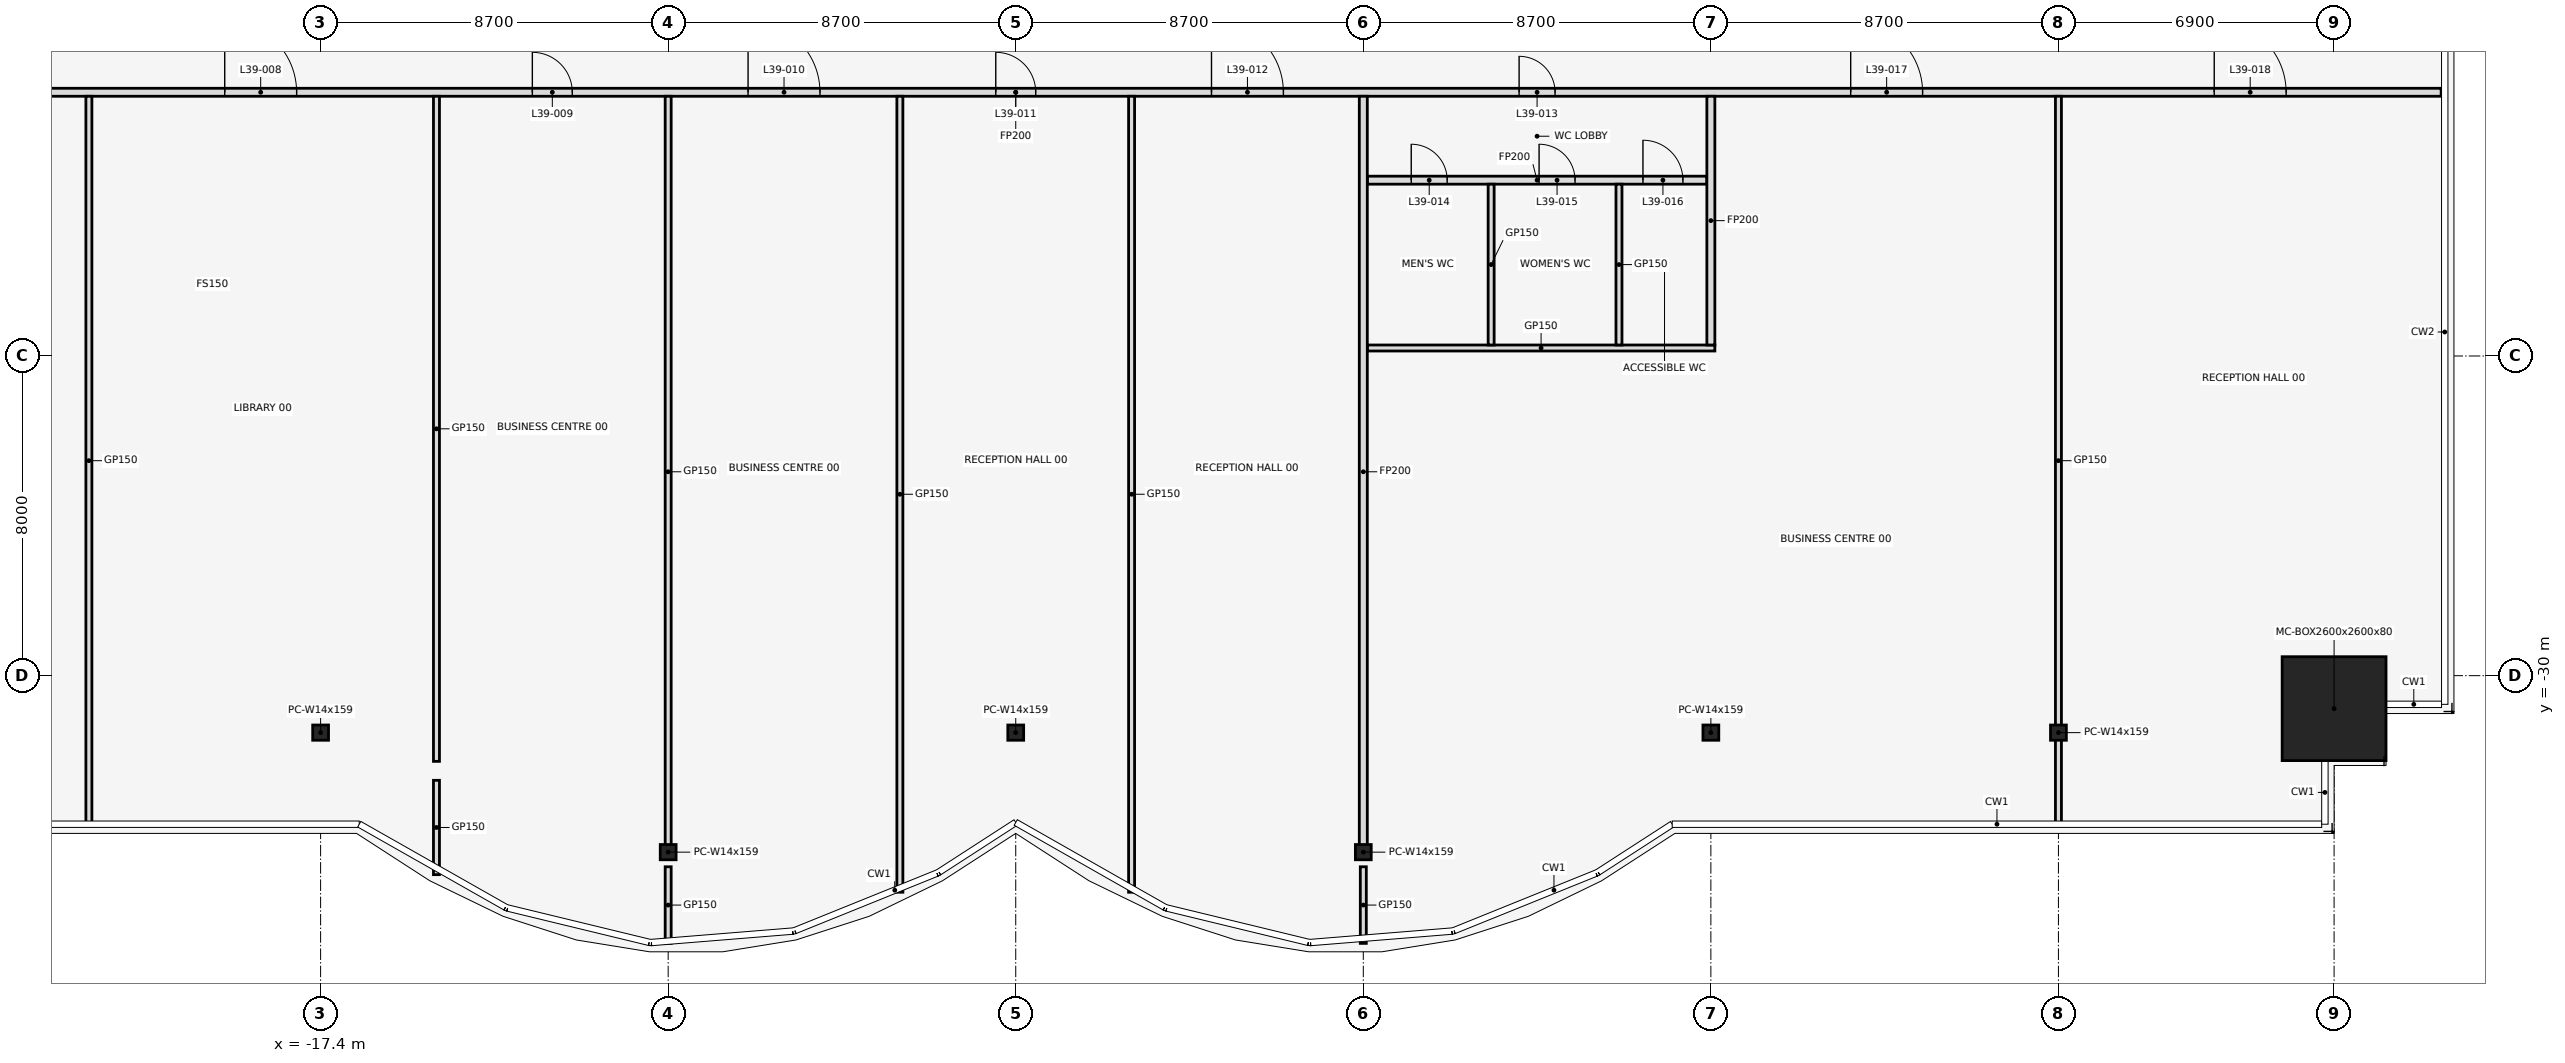
"""IFC4 building model, lengths in metres.
Left out: names, types, materials, properties, quantities, classifications, styles, units other than length and angle.
Written with IfcOpenShell. Run it as: python <this file> out.ifc"""

import sys

from ifc_helpers import new_model, si_unit, direction, frame, frame_2d, origin, origin_2d, place, context, subcontext, project, spatial, rectangle, hollow_rectangle, i_section, extrude, element, fill, save


model = new_model("IFC4")
c1 = context("Model", 3, precision=1e-05, world=origin(), true_north=direction((0.0, 1.0)))
c2 = subcontext(c1, "Body", "Model", "MODEL_VIEW")
j1 = project(units=[si_unit("LENGTHUNIT", "METRE"), si_unit("PLANEANGLEUNIT", "RADIAN")], contexts=[c1])
p1 = place(None, origin())
s1 = spatial("IfcSite", under=j1, at=p1, CompositionType="ELEMENT")
p2 = place(p1, origin())
s2 = spatial("IfcBuilding", under=s1, at=p2, CompositionType="ELEMENT")
p3 = place(p2, frame((0.0, 0.0, 177.3)))
s3 = spatial("IfcBuildingStorey", under=s2, at=p3, CompositionType="ELEMENT", Elevation=177.3)
for number, where, z_axis, x_axis in (
    (1, (-17.4, -31.426, 0.0), (0.0, 0.0, 1.0), (1.0, 0.0, 0.0)),
    (2, (-8.7, -34.417, 0.0), (0.0, 0.0, 1.0), (1.0, 0.0, 0.0)),
    (3, (0.0, -31.426, 0.0), (0.0, 0.0, 1.0), (1.0, 0.0, 0.0)),
    (4, (8.7, -34.417, 0.0), (0.0, 0.0, 1.0), (1.0, 0.0, 0.0)),
    (5, (17.4, -31.426, 0.0), (0.0, 0.0, 1.0), (1.0, 0.0, 0.0)),
    (6, (26.1, -31.426, 0.0), (0.0, 0.0, 1.0), (1.0, 0.0, 0.0)),
):
    element("IfcColumn", number, at=place(p3, frame(where, z_axis=z_axis, x_axis=x_axis)), inside=s3, PredefinedType="COLUMN", context=c2, shape_type="SweptSolid", body=[
        extrude(i_section(OverallWidth=0.396, OverallDepth=0.381, WebThickness=0.019, FlangeThickness=0.03, at=origin_2d()), origin(), (0.0, 0.0, 1.0), 4.1),
    ])
p4 = place(p3, frame((33.0, -30.826, 0.0), z_axis=(0.0, 0.0, 1.0), x_axis=(1.0, 0.0, 0.0)))
e7 = element("IfcColumn", 7, at=p4, inside=s3, PredefinedType="COLUMN", context=c2, shape_type="SweptSolid", body=[
    extrude(hollow_rectangle(XDim=2.6, YDim=2.6, WallThickness=0.08, at=origin_2d()), origin(), (0.0, 0.0, 1.0), 4.1),
])
p5 = place(p3, frame((8.8, -21.8, 0.0), z_axis=(0.0, 0.0, 1.0), x_axis=(1.0, 0.0, 0.0)))
e8 = element("IfcWall", 8, at=p5, inside=s3, PredefinedType="PARTITIONING", context=c2, shape_type="SweptSolid", body=[
    extrude(rectangle(XDim=8.7, YDim=0.15, at=frame_2d((4.35, 0.0))), origin(), (0.0, 0.0, 1.0), 2.84),
])
p6 = place(p3, frame((8.8, -17.6, 0.0), z_axis=(0.0, 0.0, 1.0), x_axis=(1.0, 0.0, 0.0)))
e9 = element("IfcWall", 9, at=p6, inside=s3, PredefinedType="PARTITIONING", context=c2, shape_type="SweptSolid", body=[
    extrude(rectangle(XDim=8.5, YDim=0.2, at=frame_2d((4.25, 0.0))), origin(), (0.0, 0.0, 1.0), 2.84),
])
p7 = place(p6, frame((1.1, 0.0, 0.0)))
e10 = element("IfcOpeningElement", 10, at=p7, cuts=e9, PredefinedType="OPENING", context=c2, shape_type="SweptSolid", body=[
    extrude(rectangle(XDim=0.9, YDim=2.1, at=frame_2d((0.45, 1.05))), frame((0.0, 0.112, 0.0), z_axis=(0.0, -1.0, 0.0), x_axis=(1.0, 0.0, 0.0)), (0.0, 0.0, 1.0), 0.224),
])
p8 = place(p6, frame((4.3, 0.0, 0.0)))
e11 = element("IfcOpeningElement", 11, at=p8, cuts=e9, PredefinedType="OPENING", context=c2, shape_type="SweptSolid", body=[
    extrude(rectangle(XDim=0.9, YDim=2.1, at=frame_2d((0.45, 1.05))), frame((0.0, 0.112, 0.0), z_axis=(0.0, -1.0, 0.0), x_axis=(1.0, 0.0, 0.0)), (0.0, 0.0, 1.0), 0.224),
])
p9 = place(p6, frame((6.9, 0.0, 0.0)))
e12 = element("IfcOpeningElement", 12, at=p9, cuts=e9, PredefinedType="OPENING", context=c2, shape_type="SweptSolid", body=[
    extrude(rectangle(XDim=1.0, YDim=2.1, at=frame_2d((0.5, 1.05))), frame((0.0, 0.112, 0.0), z_axis=(0.0, -1.0, 0.0), x_axis=(1.0, 0.0, 0.0)), (0.0, 0.0, 1.0), 0.224),
])
p10 = place(p3, frame((-35.68, -15.4, 0.0), z_axis=(0.0, 0.0, 1.0), x_axis=(1.0, 0.0, 0.0)))
e13 = element("IfcWall", 13, at=p10, inside=s3, PredefinedType="PARTITIONING", context=c2, shape_type="SweptSolid", body=[
    extrude(rectangle(XDim=71.36, YDim=0.2, at=frame_2d((35.68, 0.0))), origin(), (0.0, 0.0, 1.0), 2.84),
])
p11 = place(p10, frame((5.3, 0.0, 0.0)))
e14 = element("IfcOpeningElement", 14, at=p11, cuts=e13, PredefinedType="OPENING", context=c2, shape_type="SweptSolid", body=[
    extrude(rectangle(XDim=1.8, YDim=2.1, at=frame_2d((0.9, 1.05))), frame((0.0, 0.112, 0.0), z_axis=(0.0, -1.0, 0.0), x_axis=(1.0, 0.0, 0.0)), (0.0, 0.0, 1.0), 0.224),
])
p12 = place(p10, frame((15.88, 0.0, 0.0)))
e15 = element("IfcOpeningElement", 15, at=p12, cuts=e13, PredefinedType="OPENING", context=c2, shape_type="SweptSolid", body=[
    extrude(rectangle(XDim=1.8, YDim=2.1, at=frame_2d((0.9, 1.05))), frame((0.0, 0.112, 0.0), z_axis=(0.0, -1.0, 0.0), x_axis=(1.0, 0.0, 0.0)), (0.0, 0.0, 1.0), 0.224),
])
p13 = place(p10, frame((23.58, 0.0, 0.0)))
e16 = element("IfcOpeningElement", 16, at=p13, cuts=e13, PredefinedType="OPENING", context=c2, shape_type="SweptSolid", body=[
    extrude(rectangle(XDim=1.0, YDim=2.1, at=frame_2d((0.5, 1.05))), frame((0.0, 0.112, 0.0), z_axis=(0.0, -1.0, 0.0), x_axis=(1.0, 0.0, 0.0)), (0.0, 0.0, 1.0), 0.224),
])
p14 = place(p10, frame((28.98, 0.0, 0.0)))
e17 = element("IfcOpeningElement", 17, at=p14, cuts=e13, PredefinedType="OPENING", context=c2, shape_type="SweptSolid", body=[
    extrude(rectangle(XDim=1.8, YDim=2.1, at=frame_2d((0.9, 1.05))), frame((0.0, 0.112, 0.0), z_axis=(0.0, -1.0, 0.0), x_axis=(1.0, 0.0, 0.0)), (0.0, 0.0, 1.0), 0.224),
])
p15 = place(p10, frame((35.18, 0.0, 0.0)))
e18 = element("IfcOpeningElement", 18, at=p15, cuts=e13, PredefinedType="OPENING", context=c2, shape_type="SweptSolid", body=[
    extrude(rectangle(XDim=1.0, YDim=2.1, at=frame_2d((0.5, 1.05))), frame((0.0, 0.112, 0.0), z_axis=(0.0, -1.0, 0.0), x_axis=(1.0, 0.0, 0.0)), (0.0, 0.0, 1.0), 0.224),
])
p16 = place(p10, frame((40.58, 0.0, 0.0)))
e19 = element("IfcOpeningElement", 19, at=p16, cuts=e13, PredefinedType="OPENING", context=c2, shape_type="SweptSolid", body=[
    extrude(rectangle(XDim=1.8, YDim=2.1, at=frame_2d((0.9, 1.05))), frame((0.0, 0.112, 0.0), z_axis=(0.0, -1.0, 0.0), x_axis=(1.0, 0.0, 0.0)), (0.0, 0.0, 1.0), 0.224),
])
p17 = place(p10, frame((48.28, 0.0, 0.0)))
e20 = element("IfcOpeningElement", 20, at=p17, cuts=e13, PredefinedType="OPENING", context=c2, shape_type="SweptSolid", body=[
    extrude(rectangle(XDim=0.9, YDim=2.1, at=frame_2d((0.45, 1.05))), frame((0.0, 0.112, 0.0), z_axis=(0.0, -1.0, 0.0), x_axis=(1.0, 0.0, 0.0)), (0.0, 0.0, 1.0), 0.224),
])
p18 = place(p10, frame((56.58, 0.0, 0.0)))
e21 = element("IfcOpeningElement", 21, at=p18, cuts=e13, PredefinedType="OPENING", context=c2, shape_type="SweptSolid", body=[
    extrude(rectangle(XDim=1.8, YDim=2.1, at=frame_2d((0.9, 1.05))), frame((0.0, 0.112, 0.0), z_axis=(0.0, -1.0, 0.0), x_axis=(1.0, 0.0, 0.0)), (0.0, 0.0, 1.0), 0.224),
])
p19 = place(p10, frame((65.68, 0.0, 0.0)))
e22 = element("IfcOpeningElement", 22, at=p19, cuts=e13, PredefinedType="OPENING", context=c2, shape_type="SweptSolid", body=[
    extrude(rectangle(XDim=1.8, YDim=2.1, at=frame_2d((0.9, 1.05))), frame((0.0, 0.112, 0.0), z_axis=(0.0, -1.0, 0.0), x_axis=(1.0, 0.0, 0.0)), (0.0, 0.0, 1.0), 0.224),
])
p20 = place(p3, frame((-23.2, -33.74, 0.0), z_axis=(0.0, 0.0, 1.0), x_axis=(0.0, 1.0, 0.0)))
e23 = element("IfcWall", 23, at=p20, inside=s3, PredefinedType="PARTITIONING", context=c2, shape_type="SweptSolid", body=[
    extrude(rectangle(XDim=18.24, YDim=0.15, at=frame_2d((9.12, 0.0))), origin(), (0.0, 0.0, 1.0), 2.84),
])
p21 = place(p3, frame((-14.5, -34.98, 0.0), z_axis=(0.0, 0.0, 1.0), x_axis=(0.0, 1.0, 0.0)))
e24 = element("IfcWall", 24, at=p21, inside=s3, PredefinedType="PARTITIONING", context=c2, shape_type="SweptSolid", body=[
    extrude(rectangle(XDim=2.36, YDim=0.15, at=frame_2d((1.18, 0.0))), origin(), (0.0, 0.0, 1.0), 2.84),
])
p22 = place(p3, frame((-14.5, -32.145, 0.0), z_axis=(0.0, 0.0, 1.0), x_axis=(0.0, 1.0, 0.0)))
e25 = element("IfcWall", 25, at=p22, inside=s3, PredefinedType="PARTITIONING", context=c2, shape_type="SweptSolid", body=[
    extrude(rectangle(XDim=16.645, YDim=0.15, at=frame_2d((8.323, 0.0))), origin(), (0.0, 0.0, 1.0), 2.84),
])
p23 = place(p3, frame((-8.7, -36.7, 0.0), z_axis=(0.0, 0.0, 1.0), x_axis=(0.0, 1.0, 0.0)))
e26 = element("IfcWall", 26, at=p23, inside=s3, PredefinedType="PARTITIONING", context=c2, shape_type="SweptSolid", body=[
    extrude(rectangle(XDim=1.917, YDim=0.15, at=frame_2d((0.958, 0.0))), origin(), (0.0, 0.0, 1.0), 2.84),
])
p24 = place(p3, frame((-8.7, -34.295, 0.0), z_axis=(0.0, 0.0, 1.0), x_axis=(0.0, 1.0, 0.0)))
e27 = element("IfcWall", 27, at=p24, inside=s3, PredefinedType="PARTITIONING", context=c2, shape_type="SweptSolid", body=[
    extrude(rectangle(XDim=18.795, YDim=0.15, at=frame_2d((9.397, 0.0))), origin(), (0.0, 0.0, 1.0), 2.84),
])
for number, where, z_axis, x_axis in (
    (28, (-2.9, -35.42, 0.0), (0.0, 0.0, 1.0), (0.0, 1.0, 0.0)),
    (29, (2.9, -35.42, 0.0), (0.0, 0.0, 1.0), (0.0, 1.0, 0.0)),
):
    element("IfcWall", number, at=place(p3, frame(where, z_axis=z_axis, x_axis=x_axis)), inside=s3, PredefinedType="PARTITIONING", context=c2, shape_type="SweptSolid", body=[
        extrude(rectangle(XDim=19.92, YDim=0.15, at=frame_2d((9.96, 0.0))), origin(), (0.0, 0.0, 1.0), 2.84),
    ])
p25 = place(p3, frame((8.7, -36.7, 0.0), z_axis=(0.0, 0.0, 1.0), x_axis=(0.0, 1.0, 0.0)))
e30 = element("IfcWall", 30, at=p25, inside=s3, PredefinedType="PARTITIONING", context=c2, shape_type="SweptSolid", body=[
    extrude(rectangle(XDim=1.917, YDim=0.15, at=frame_2d((0.958, 0.0))), origin(), (0.0, 0.0, 1.0), 2.84),
])
p26 = place(p3, frame((8.7, -34.295, 0.0), z_axis=(0.0, 0.0, 1.0), x_axis=(0.0, 1.0, 0.0)))
e31 = element("IfcWall", 31, at=p26, inside=s3, PredefinedType="PARTITIONING", context=c2, shape_type="SweptSolid", body=[
    extrude(rectangle(XDim=18.795, YDim=0.2, at=frame_2d((9.397, 0.0))), origin(), (0.0, 0.0, 1.0), 2.84),
])
for number, where, z_axis, x_axis in (
    (32, (11.9, -21.725, 0.0), (0.0, 0.0, 1.0), (0.0, 1.0, 0.0)),
    (33, (15.1, -21.725, 0.0), (0.0, 0.0, 1.0), (0.0, 1.0, 0.0)),
):
    element("IfcWall", number, at=place(p3, frame(where, z_axis=z_axis, x_axis=x_axis)), inside=s3, PredefinedType="PARTITIONING", context=c2, shape_type="SweptSolid", body=[
        extrude(rectangle(XDim=4.025, YDim=0.15, at=frame_2d((2.013, 0.0))), origin(), (0.0, 0.0, 1.0), 2.84),
    ])
p27 = place(p3, frame((17.4, -21.725, 0.0), z_axis=(0.0, 0.0, 1.0), x_axis=(0.0, 1.0, 0.0)))
e34 = element("IfcWall", 34, at=p27, inside=s3, PredefinedType="PARTITIONING", context=c2, shape_type="SweptSolid", body=[
    extrude(rectangle(XDim=6.225, YDim=0.2, at=frame_2d((3.113, 0.0))), origin(), (0.0, 0.0, 1.0), 2.84),
])
p28 = place(p3, frame((26.1, -33.74, 0.0), z_axis=(0.0, 0.0, 1.0), x_axis=(0.0, 1.0, 0.0)))
e35 = element("IfcWall", 35, at=p28, inside=s3, PredefinedType="PARTITIONING", context=c2, shape_type="SweptSolid", body=[
    extrude(rectangle(XDim=18.24, YDim=0.15, at=frame_2d((9.12, 0.0))), origin(), (0.0, 0.0, 1.0), 2.84),
])
p29 = place(p12, origin())
e36 = element("IfcDoor", 36, at=p29, inside=s3, OperationType="SINGLE_SWING_LEFT", PredefinedType="DOOR", context=c2, shape_type="SweptSolid", body=[
    extrude(rectangle(XDim=1.8, YDim=2.1, at=frame_2d((0.9, 1.05))), frame((0.0, 0.025, 0.0), z_axis=(0.0, -1.0, 0.0), x_axis=(1.0, 0.0, 0.0)), (0.0, 0.0, 1.0), 0.05),
])
fill(e15, e36)
p30 = place(p13, frame((1.0, 0.0, 0.0), z_axis=(0.0, 0.0, 1.0), x_axis=(-1.0, 0.0, 0.0)))
e37 = element("IfcDoor", 37, at=p30, inside=s3, OperationType="SINGLE_SWING_RIGHT", PredefinedType="DOOR", context=c2, shape_type="SweptSolid", body=[
    extrude(rectangle(XDim=1.0, YDim=2.1, at=frame_2d((0.5, 1.05))), frame((0.0, 0.025, 0.0), z_axis=(0.0, -1.0, 0.0), x_axis=(1.0, 0.0, 0.0)), (0.0, 0.0, 1.0), 0.05),
])
fill(e16, e37)
p31 = place(p14, origin())
e38 = element("IfcDoor", 38, at=p31, inside=s3, OperationType="SINGLE_SWING_LEFT", PredefinedType="DOOR", context=c2, shape_type="SweptSolid", body=[
    extrude(rectangle(XDim=1.8, YDim=2.1, at=frame_2d((0.9, 1.05))), frame((0.0, 0.025, 0.0), z_axis=(0.0, -1.0, 0.0), x_axis=(1.0, 0.0, 0.0)), (0.0, 0.0, 1.0), 0.05),
])
fill(e17, e38)
p32 = place(p15, frame((1.0, 0.0, 0.0), z_axis=(0.0, 0.0, 1.0), x_axis=(-1.0, 0.0, 0.0)))
e39 = element("IfcDoor", 39, at=p32, inside=s3, OperationType="SINGLE_SWING_RIGHT", PredefinedType="DOOR", context=c2, shape_type="SweptSolid", body=[
    extrude(rectangle(XDim=1.0, YDim=2.1, at=frame_2d((0.5, 1.05))), frame((0.0, 0.025, 0.0), z_axis=(0.0, -1.0, 0.0), x_axis=(1.0, 0.0, 0.0)), (0.0, 0.0, 1.0), 0.05),
])
fill(e18, e39)
p33 = place(p16, origin())
e40 = element("IfcDoor", 40, at=p33, inside=s3, OperationType="SINGLE_SWING_LEFT", PredefinedType="DOOR", context=c2, shape_type="SweptSolid", body=[
    extrude(rectangle(XDim=1.8, YDim=2.1, at=frame_2d((0.9, 1.05))), frame((0.0, 0.025, 0.0), z_axis=(0.0, -1.0, 0.0), x_axis=(1.0, 0.0, 0.0)), (0.0, 0.0, 1.0), 0.05),
])
fill(e19, e40)
p34 = place(p17, frame((0.9, 0.0, 0.0), z_axis=(0.0, 0.0, 1.0), x_axis=(-1.0, 0.0, 0.0)))
e41 = element("IfcDoor", 41, at=p34, inside=s3, OperationType="SINGLE_SWING_LEFT", PredefinedType="DOOR", context=c2, shape_type="SweptSolid", body=[
    extrude(rectangle(XDim=0.9, YDim=2.1, at=frame_2d((0.45, 1.05))), frame((0.0, 0.025, 0.0), z_axis=(0.0, -1.0, 0.0), x_axis=(1.0, 0.0, 0.0)), (0.0, 0.0, 1.0), 0.05),
])
fill(e20, e41)
p35 = place(p7, frame((0.9, 0.0, 0.0), z_axis=(0.0, 0.0, 1.0), x_axis=(-1.0, 0.0, 0.0)))
e42 = element("IfcDoor", 42, at=p35, inside=s3, OperationType="SINGLE_SWING_RIGHT", PredefinedType="DOOR", context=c2, shape_type="SweptSolid", body=[
    extrude(rectangle(XDim=0.9, YDim=2.1, at=frame_2d((0.45, 1.05))), frame((0.0, 0.025, 0.0), z_axis=(0.0, -1.0, 0.0), x_axis=(1.0, 0.0, 0.0)), (0.0, 0.0, 1.0), 0.05),
])
fill(e10, e42)
p36 = place(p8, frame((0.9, 0.0, 0.0), z_axis=(0.0, 0.0, 1.0), x_axis=(-1.0, 0.0, 0.0)))
e43 = element("IfcDoor", 43, at=p36, inside=s3, OperationType="SINGLE_SWING_RIGHT", PredefinedType="DOOR", context=c2, shape_type="SweptSolid", body=[
    extrude(rectangle(XDim=0.9, YDim=2.1, at=frame_2d((0.45, 1.05))), frame((0.0, 0.025, 0.0), z_axis=(0.0, -1.0, 0.0), x_axis=(1.0, 0.0, 0.0)), (0.0, 0.0, 1.0), 0.05),
])
fill(e11, e43)
p37 = place(p9, frame((1.0, 0.0, 0.0), z_axis=(0.0, 0.0, 1.0), x_axis=(-1.0, 0.0, 0.0)))
e44 = element("IfcDoor", 44, at=p37, inside=s3, OperationType="SINGLE_SWING_LEFT", PredefinedType="DOOR", context=c2, shape_type="SweptSolid", body=[
    extrude(rectangle(XDim=1.0, YDim=2.1, at=frame_2d((0.5, 1.05))), frame((0.0, 0.025, 0.0), z_axis=(0.0, -1.0, 0.0), x_axis=(1.0, 0.0, 0.0)), (0.0, 0.0, 1.0), 0.05),
])
fill(e12, e44)
p38 = place(p18, origin())
e45 = element("IfcDoor", 45, at=p38, inside=s3, OperationType="SINGLE_SWING_LEFT", PredefinedType="DOOR", context=c2, shape_type="SweptSolid", body=[
    extrude(rectangle(XDim=1.8, YDim=2.1, at=frame_2d((0.9, 1.05))), frame((0.0, 0.025, 0.0), z_axis=(0.0, -1.0, 0.0), x_axis=(1.0, 0.0, 0.0)), (0.0, 0.0, 1.0), 0.05),
])
fill(e21, e45)
p39 = place(p19, origin())
e46 = element("IfcDoor", 46, at=p39, inside=s3, OperationType="SINGLE_SWING_LEFT", PredefinedType="DOOR", context=c2, shape_type="SweptSolid", body=[
    extrude(rectangle(XDim=1.8, YDim=2.1, at=frame_2d((0.9, 1.05))), frame((0.0, 0.025, 0.0), z_axis=(0.0, -1.0, 0.0), x_axis=(1.0, 0.0, 0.0)), (0.0, 0.0, 1.0), 0.05),
])
fill(e22, e46)
save(model, sys.argv[1])
